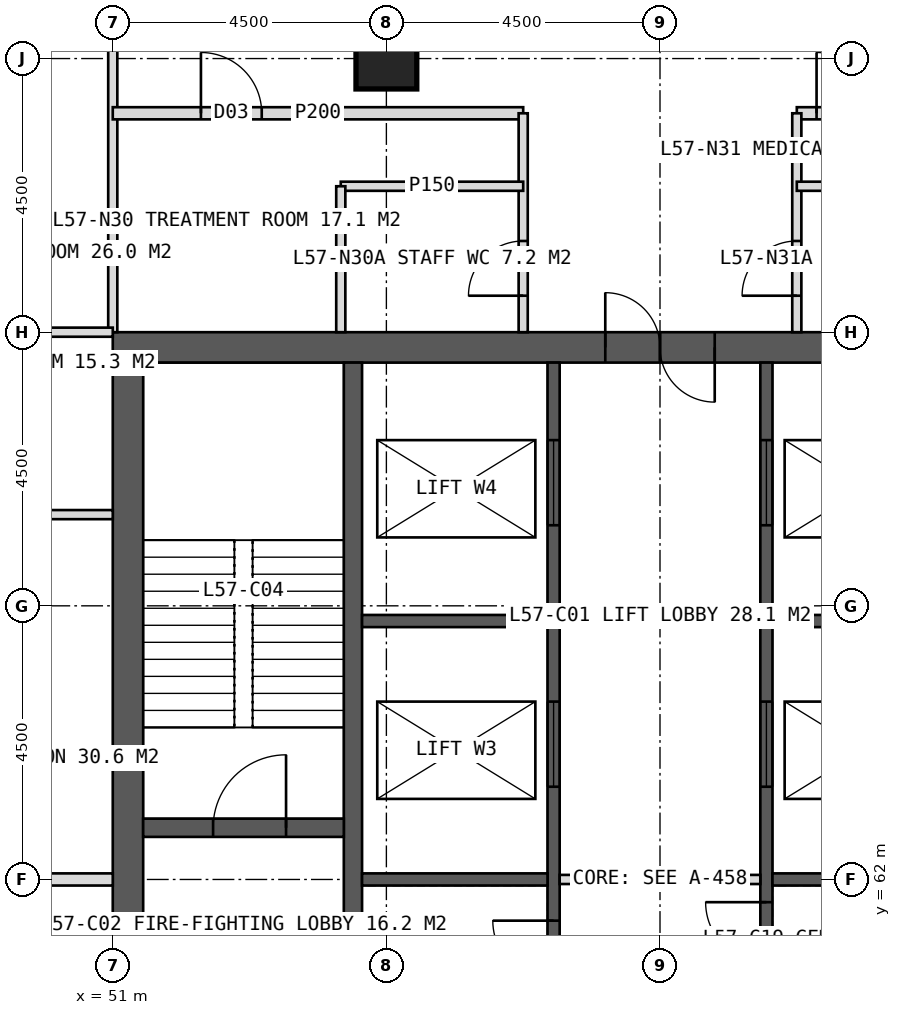
"""IFC4 building model, lengths in metres.
Left out: names, types, materials, properties, quantities, classifications, styles, units other than length and angle.
Written with IfcOpenShell. Run it as: python <this file> out.ifc"""

import sys

from ifc_helpers import new_model, si_unit, direction, frame, frame_2d, origin, origin_2d, place, context, subcontext, project, spatial, rectangle, hollow_rectangle, extrude, element, fill, save


model = new_model("IFC4")
c1 = context("Model", 3, precision=1e-05, world=origin(), true_north=direction((0.0, 1.0)))
c2 = subcontext(c1, "Body", "Model", "MODEL_VIEW")
j1 = project(units=[si_unit("LENGTHUNIT", "METRE"), si_unit("PLANEANGLEUNIT", "RADIAN")], contexts=[c1])
p1 = place(None, origin())
s1 = spatial("IfcSite", under=j1, at=p1, CompositionType="ELEMENT")
p2 = place(p1, origin())
s2 = spatial("IfcBuilding", under=s1, at=p2, CompositionType="ELEMENT")
p3 = place(p2, frame((0.0, 0.0, 237.0)))
s3 = spatial("IfcBuildingStorey", under=s2, at=p3, CompositionType="ELEMENT", Elevation=237.0)
p4 = place(p3, frame((51.0, 70.75, 0.0), z_axis=(0.0, 0.0, 1.0), x_axis=(1.0, 0.0, 0.0)))
e1 = element("IfcWall", 1, at=p4, inside=s3, PredefinedType="SHEAR", context=c2, shape_type="SweptSolid", body=[
    extrude(rectangle(XDim=18.0, YDim=0.5, at=frame_2d((9.0, 0.0))), origin(), (0.0, 0.0, 1.0), 4.0),
])
p5 = place(p4, frame((8.1, 0.0, 0.0)))
e2 = element("IfcOpeningElement", 2, at=p5, cuts=e1, PredefinedType="OPENING", context=c2, shape_type="SweptSolid", body=[
    extrude(rectangle(XDim=1.8, YDim=2.2, at=frame_2d((0.9, 1.1))), frame((0.0, 0.26, 0.0), z_axis=(0.0, -1.0, 0.0), x_axis=(1.0, 0.0, 0.0)), (0.0, 0.0, 1.0), 0.52),
])
p6 = place(p3, frame((51.25, 53.5, 0.0), z_axis=(0.0, 0.0, 1.0), x_axis=(0.0, 1.0, 0.0)))
e3 = element("IfcWall", 3, at=p6, inside=s3, PredefinedType="SHEAR", context=c2, shape_type="SweptSolid", body=[
    extrude(rectangle(XDim=17.0, YDim=0.5, at=frame_2d((8.5, 0.0))), origin(), (0.0, 0.0, 1.0), 4.0),
])
p7 = place(p6, frame((6.1, 0.0, 0.0)))
e4 = element("IfcOpeningElement", 4, at=p7, cuts=e3, PredefinedType="OPENING", context=c2, shape_type="SweptSolid", body=[
    extrude(rectangle(XDim=1.5, YDim=2.2, at=frame_2d((0.75, 1.1))), frame((0.0, 0.26, 0.0), z_axis=(0.0, -1.0, 0.0), x_axis=(1.0, 0.0, 0.0)), (0.0, 0.0, 1.0), 0.52),
])
p8 = place(p3, frame((54.95, 53.5, 0.0), z_axis=(0.0, 0.0, 1.0), x_axis=(0.0, 1.0, 0.0)))
e5 = element("IfcWall", 5, at=p8, inside=s3, PredefinedType="SHEAR", context=c2, shape_type="SweptSolid", body=[
    extrude(rectangle(XDim=17.0, YDim=0.3, at=frame_2d((8.5, 0.0))), origin(), (0.0, 0.0, 1.0), 4.0),
])
p9 = place(p3, frame((58.25, 53.5, 0.0), z_axis=(0.0, 0.0, 1.0), x_axis=(0.0, 1.0, 0.0)))
e6 = element("IfcWall", 6, at=p9, inside=s3, PredefinedType="SHEAR", context=c2, shape_type="SweptSolid", body=[
    extrude(rectangle(XDim=17.0, YDim=0.2, at=frame_2d((8.5, 0.0))), origin(), (0.0, 0.0, 1.0), 4.0),
])
p10 = place(p9, frame((0.808, 0.0, 0.0)))
e7 = element("IfcOpeningElement", 7, at=p10, cuts=e6, PredefinedType="OPENING", context=c2, shape_type="SweptSolid", body=[
    extrude(rectangle(XDim=1.0, YDim=2.1, at=frame_2d((0.5, 1.05))), frame((0.0, 0.11, 0.0), z_axis=(0.0, -1.0, 0.0), x_axis=(1.0, 0.0, 0.0)), (0.0, 0.0, 1.0), 0.22),
])
p11 = place(p9, frame((2.958, 0.0, 0.0)))
e8 = element("IfcOpeningElement", 8, at=p11, cuts=e6, PredefinedType="OPENING", context=c2, shape_type="SweptSolid", body=[
    extrude(rectangle(XDim=1.0, YDim=2.1, at=frame_2d((0.5, 1.05))), frame((0.0, 0.11, 0.0), z_axis=(0.0, -1.0, 0.0), x_axis=(1.0, 0.0, 0.0)), (0.0, 0.0, 1.0), 0.22),
])
p12 = place(p9, frame((4.722, 0.0, 0.0)))
e9 = element("IfcOpeningElement", 9, at=p12, cuts=e6, PredefinedType="OPENING", context=c2, shape_type="SweptSolid", body=[
    extrude(rectangle(XDim=1.0, YDim=2.1, at=frame_2d((0.5, 1.05))), frame((0.0, 0.11, 0.0), z_axis=(0.0, -1.0, 0.0), x_axis=(1.0, 0.0, 0.0)), (0.0, 0.0, 1.0), 0.22),
])
p13 = place(p9, frame((6.823, 0.0, 0.0)))
e10 = element("IfcOpeningElement", 10, at=p13, cuts=e6, PredefinedType="OPENING", context=c2, shape_type="SweptSolid", body=[
    extrude(rectangle(XDim=1.0, YDim=2.1, at=frame_2d((0.5, 1.05))), frame((0.0, 0.11, 0.0), z_axis=(0.0, -1.0, 0.0), x_axis=(1.0, 0.0, 0.0)), (0.0, 0.0, 1.0), 0.22),
])
p14 = place(p9, frame((10.025, 0.0, 0.0)))
e11 = element("IfcOpeningElement", 11, at=p14, cuts=e6, PredefinedType="OPENING", context=c2, shape_type="SweptSolid", body=[
    extrude(rectangle(XDim=1.4, YDim=2.2, at=frame_2d((0.7, 1.1))), frame((0.0, 0.11, 0.0), z_axis=(0.0, -1.0, 0.0), x_axis=(1.0, 0.0, 0.0)), (0.0, 0.0, 1.0), 0.22),
])
p15 = place(p9, frame((14.325, 0.0, 0.0)))
e12 = element("IfcOpeningElement", 12, at=p15, cuts=e6, PredefinedType="OPENING", context=c2, shape_type="SweptSolid", body=[
    extrude(rectangle(XDim=1.4, YDim=2.2, at=frame_2d((0.7, 1.1))), frame((0.0, 0.11, 0.0), z_axis=(0.0, -1.0, 0.0), x_axis=(1.0, 0.0, 0.0)), (0.0, 0.0, 1.0), 0.22),
])
p16 = place(p3, frame((61.75, 53.5, 0.0), z_axis=(0.0, 0.0, 1.0), x_axis=(0.0, 1.0, 0.0)))
e13 = element("IfcWall", 13, at=p16, inside=s3, PredefinedType="SHEAR", context=c2, shape_type="SweptSolid", body=[
    extrude(rectangle(XDim=17.0, YDim=0.2, at=frame_2d((8.5, 0.0))), origin(), (0.0, 0.0, 1.0), 4.0),
])
p17 = place(p16, frame((0.496, 0.0, 0.0)))
e14 = element("IfcOpeningElement", 14, at=p17, cuts=e13, PredefinedType="OPENING", context=c2, shape_type="SweptSolid", body=[
    extrude(rectangle(XDim=1.0, YDim=2.1, at=frame_2d((0.5, 1.05))), frame((0.0, 0.11, 0.0), z_axis=(0.0, -1.0, 0.0), x_axis=(1.0, 0.0, 0.0)), (0.0, 0.0, 1.0), 0.22),
])
p18 = place(p16, frame((2.646, 0.0, 0.0)))
e15 = element("IfcOpeningElement", 15, at=p18, cuts=e13, PredefinedType="OPENING", context=c2, shape_type="SweptSolid", body=[
    extrude(rectangle(XDim=1.0, YDim=2.1, at=frame_2d((0.5, 1.05))), frame((0.0, 0.11, 0.0), z_axis=(0.0, -1.0, 0.0), x_axis=(1.0, 0.0, 0.0)), (0.0, 0.0, 1.0), 0.22),
])
p19 = place(p16, frame((5.027, 0.0, 0.0)))
e16 = element("IfcOpeningElement", 16, at=p19, cuts=e13, PredefinedType="OPENING", context=c2, shape_type="SweptSolid", body=[
    extrude(rectangle(XDim=1.0, YDim=2.1, at=frame_2d((0.5, 1.05))), frame((0.0, 0.11, 0.0), z_axis=(0.0, -1.0, 0.0), x_axis=(1.0, 0.0, 0.0)), (0.0, 0.0, 1.0), 0.22),
])
p20 = place(p16, frame((7.126, 0.0, 0.0)))
e17 = element("IfcOpeningElement", 17, at=p20, cuts=e13, PredefinedType="OPENING", context=c2, shape_type="SweptSolid", body=[
    extrude(rectangle(XDim=1.0, YDim=2.1, at=frame_2d((0.5, 1.05))), frame((0.0, 0.11, 0.0), z_axis=(0.0, -1.0, 0.0), x_axis=(1.0, 0.0, 0.0)), (0.0, 0.0, 1.0), 0.22),
])
p21 = place(p16, frame((10.025, 0.0, 0.0)))
e18 = element("IfcOpeningElement", 18, at=p21, cuts=e13, PredefinedType="OPENING", context=c2, shape_type="SweptSolid", body=[
    extrude(rectangle(XDim=1.4, YDim=2.2, at=frame_2d((0.7, 1.1))), frame((0.0, 0.11, 0.0), z_axis=(0.0, -1.0, 0.0), x_axis=(1.0, 0.0, 0.0)), (0.0, 0.0, 1.0), 0.22),
])
p22 = place(p16, frame((14.325, 0.0, 0.0)))
e19 = element("IfcOpeningElement", 19, at=p22, cuts=e13, PredefinedType="OPENING", context=c2, shape_type="SweptSolid", body=[
    extrude(rectangle(XDim=1.4, YDim=2.2, at=frame_2d((0.7, 1.1))), frame((0.0, 0.11, 0.0), z_axis=(0.0, -1.0, 0.0), x_axis=(1.0, 0.0, 0.0)), (0.0, 0.0, 1.0), 0.22),
])
for number, where, z_axis, x_axis in (
    (20, (55.1, 62.0, 0.0), (0.0, 0.0, 1.0), (1.0, 0.0, 0.0)),
    (21, (61.85, 62.0, 0.0), (0.0, 0.0, 1.0), (1.0, 0.0, 0.0)),
    (22, (55.1, 66.25, 0.0), (0.0, 0.0, 1.0), (1.0, 0.0, 0.0)),
    (23, (61.85, 66.25, 0.0), (0.0, 0.0, 1.0), (1.0, 0.0, 0.0)),
):
    element("IfcWall", number, at=place(p3, frame(where, z_axis=z_axis, x_axis=x_axis)), inside=s3, PredefinedType="SHEAR", context=c2, shape_type="SweptSolid", body=[
        extrude(rectangle(XDim=3.05, YDim=0.2, at=frame_2d((1.525, 0.0))), origin(), (0.0, 0.0, 1.0), 4.0),
    ])
p23 = place(p3, frame((51.5, 62.85, 0.0), z_axis=(0.0, 0.0, 1.0), x_axis=(1.0, 0.0, 0.0)))
e24 = element("IfcWall", 24, at=p23, inside=s3, PredefinedType="SHEAR", context=c2, shape_type="SweptSolid", body=[
    extrude(rectangle(XDim=3.3, YDim=0.3, at=frame_2d((1.65, 0.0))), origin(), (0.0, 0.0, 1.0), 4.0),
])
p24 = place(p23, frame((1.15, 0.0, 0.0)))
e25 = element("IfcOpeningElement", 25, at=p24, cuts=e24, PredefinedType="OPENING", context=c2, shape_type="SweptSolid", body=[
    extrude(rectangle(XDim=1.2, YDim=2.1, at=frame_2d((0.6, 1.05))), frame((0.0, 0.16, 0.0), z_axis=(0.0, -1.0, 0.0), x_axis=(1.0, 0.0, 0.0)), (0.0, 0.0, 1.0), 0.32),
])
p25 = place(p3, frame((55.5, 75.5, 0.0), z_axis=(0.0, 0.0, 1.0), x_axis=(1.0, 0.0, 0.0)))
e26 = element("IfcColumn", 26, at=p25, inside=s3, PredefinedType="COLUMN", context=c2, shape_type="SweptSolid", body=[
    extrude(hollow_rectangle(XDim=1.0, YDim=1.0, WallThickness=0.1, at=origin_2d()), origin(), (0.0, 0.0, 1.0), 4.0),
])
p26 = place(p3, frame((51.0, 71.0, 0.0), z_axis=(0.0, 0.0, 1.0), x_axis=(0.0, 1.0, 0.0)))
e27 = element("IfcWall", 27, at=p26, inside=s3, PredefinedType="PARTITIONING", context=c2, shape_type="SweptSolid", body=[
    extrude(rectangle(XDim=5.1, YDim=0.15, at=frame_2d((2.55, 0.0))), origin(), (0.0, 0.0, 1.0), 3.75),
])
p27 = place(p3, frame((51.0, 74.6, 0.0), z_axis=(0.0, 0.0, 1.0), x_axis=(1.0, 0.0, 0.0)))
e28 = element("IfcWall", 28, at=p27, inside=s3, PredefinedType="PARTITIONING", context=c2, shape_type="SweptSolid", body=[
    extrude(rectangle(XDim=6.75, YDim=0.2, at=frame_2d((3.375, 0.0))), origin(), (0.0, 0.0, 1.0), 3.75),
])
p28 = place(p27, frame((1.45, 0.0, 0.0)))
e29 = element("IfcOpeningElement", 29, at=p28, cuts=e28, PredefinedType="OPENING", context=c2, shape_type="SweptSolid", body=[
    extrude(rectangle(XDim=1.0, YDim=2.1, at=frame_2d((0.5, 1.05))), frame((0.0, 0.11, 0.0), z_axis=(0.0, -1.0, 0.0), x_axis=(1.0, 0.0, 0.0)), (0.0, 0.0, 1.0), 0.22),
])
p29 = place(p3, frame((62.25, 74.6, 0.0), z_axis=(0.0, 0.0, 1.0), x_axis=(1.0, 0.0, 0.0)))
e30 = element("IfcWall", 30, at=p29, inside=s3, PredefinedType="PARTITIONING", context=c2, shape_type="SweptSolid", body=[
    extrude(rectangle(XDim=6.75, YDim=0.2, at=frame_2d((3.375, 0.0))), origin(), (0.0, 0.0, 1.0), 3.75),
])
p30 = place(p29, frame((0.325, 0.0, 0.0)))
e31 = element("IfcOpeningElement", 31, at=p30, cuts=e30, PredefinedType="OPENING", context=c2, shape_type="SweptSolid", body=[
    extrude(rectangle(XDim=1.0, YDim=2.1, at=frame_2d((0.5, 1.05))), frame((0.0, 0.11, 0.0), z_axis=(0.0, -1.0, 0.0), x_axis=(1.0, 0.0, 0.0)), (0.0, 0.0, 1.0), 0.22),
])
p31 = place(p29, frame((4.75, 0.0, 0.0)))
e32 = element("IfcOpeningElement", 32, at=p31, cuts=e30, PredefinedType="OPENING", context=c2, shape_type="SweptSolid", body=[
    extrude(rectangle(XDim=1.0, YDim=2.1, at=frame_2d((0.5, 1.05))), frame((0.0, 0.11, 0.0), z_axis=(0.0, -1.0, 0.0), x_axis=(1.0, 0.0, 0.0)), (0.0, 0.0, 1.0), 0.22),
])
p32 = place(p3, frame((57.75, 71.0, 0.0), z_axis=(0.0, 0.0, 1.0), x_axis=(0.0, 1.0, 0.0)))
e33 = element("IfcWall", 33, at=p32, inside=s3, PredefinedType="PARTITIONING", context=c2, shape_type="SweptSolid", body=[
    extrude(rectangle(XDim=3.6, YDim=0.15, at=frame_2d((1.8, 0.0))), origin(), (0.0, 0.0, 1.0), 3.75),
])
p33 = place(p32, frame((0.6, 0.0, 0.0)))
e34 = element("IfcOpeningElement", 34, at=p33, cuts=e33, PredefinedType="OPENING", context=c2, shape_type="SweptSolid", body=[
    extrude(rectangle(XDim=0.9, YDim=2.1, at=frame_2d((0.45, 1.05))), frame((0.0, 0.085, 0.0), z_axis=(0.0, -1.0, 0.0), x_axis=(1.0, 0.0, 0.0)), (0.0, 0.0, 1.0), 0.17),
])
p34 = place(p3, frame((62.25, 71.0, 0.0), z_axis=(0.0, 0.0, 1.0), x_axis=(0.0, 1.0, 0.0)))
e35 = element("IfcWall", 35, at=p34, inside=s3, PredefinedType="PARTITIONING", context=c2, shape_type="SweptSolid", body=[
    extrude(rectangle(XDim=3.6, YDim=0.15, at=frame_2d((1.8, 0.0))), origin(), (0.0, 0.0, 1.0), 3.75),
])
p35 = place(p34, frame((0.6, 0.0, 0.0)))
e36 = element("IfcOpeningElement", 36, at=p35, cuts=e35, PredefinedType="OPENING", context=c2, shape_type="SweptSolid", body=[
    extrude(rectangle(XDim=0.9, YDim=2.1, at=frame_2d((0.45, 1.05))), frame((0.0, 0.085, 0.0), z_axis=(0.0, -1.0, 0.0), x_axis=(1.0, 0.0, 0.0)), (0.0, 0.0, 1.0), 0.17),
])
p36 = place(p3, frame((54.75, 73.4, 0.0), z_axis=(0.0, 0.0, 1.0), x_axis=(1.0, 0.0, 0.0)))
e37 = element("IfcWall", 37, at=p36, inside=s3, PredefinedType="PARTITIONING", context=c2, shape_type="SweptSolid", body=[
    extrude(rectangle(XDim=3.0, YDim=0.15, at=frame_2d((1.5, 0.0))), origin(), (0.0, 0.0, 1.0), 3.75),
])
p37 = place(p3, frame((54.75, 71.0, 0.0), z_axis=(0.0, 0.0, 1.0), x_axis=(0.0, 1.0, 0.0)))
e38 = element("IfcWall", 38, at=p37, inside=s3, PredefinedType="PARTITIONING", context=c2, shape_type="SweptSolid", body=[
    extrude(rectangle(XDim=2.4, YDim=0.15, at=frame_2d((1.2, 0.0))), origin(), (0.0, 0.0, 1.0), 3.75),
])
p38 = place(p3, frame((62.25, 73.4, 0.0), z_axis=(0.0, 0.0, 1.0), x_axis=(1.0, 0.0, 0.0)))
e39 = element("IfcWall", 39, at=p38, inside=s3, PredefinedType="PARTITIONING", context=c2, shape_type="SweptSolid", body=[
    extrude(rectangle(XDim=3.0, YDim=0.15, at=frame_2d((1.5, 0.0))), origin(), (0.0, 0.0, 1.0), 3.75),
])
p39 = place(p3, frame((51.0, 62.0, 0.0), z_axis=(0.0, 0.0, 1.0), x_axis=(-1.0, 0.0, 0.0)))
e40 = element("IfcWall", 40, at=p39, inside=s3, PredefinedType="SOLIDWALL", context=c2, shape_type="SweptSolid", body=[
    extrude(rectangle(XDim=5.1, YDim=0.2, at=frame_2d((2.55, 0.0))), origin(), (0.0, 0.0, 1.0), 2.95),
])
for number, where, z_axis, x_axis in (
    (41, (51.0, 68.0, 0.0), (0.0, 0.0, 1.0), (-1.0, 0.0, 0.0)),
    (42, (51.0, 71.0, 0.0), (0.0, 0.0, 1.0), (-1.0, 0.0, 0.0)),
):
    element("IfcWall", number, at=place(p3, frame(where, z_axis=z_axis, x_axis=x_axis)), inside=s3, PredefinedType="PARTITIONING", context=c2, shape_type="SweptSolid", body=[
        extrude(rectangle(XDim=5.1, YDim=0.15, at=frame_2d((2.55, 0.0))), origin(), (0.0, 0.0, 1.0), 3.75),
    ])
p40 = place(p3, frame((58.35, 62.0, 0.0), z_axis=(0.0, 0.0, 1.0), x_axis=(1.0, 0.0, 0.0)))
e43 = element("IfcWall", 43, at=p40, inside=s3, PredefinedType="PARTITIONING", context=c2, shape_type="SweptSolid", body=[
    extrude(rectangle(XDim=3.3, YDim=0.15, at=frame_2d((1.65, 0.0))), origin(), (0.0, 0.0, 1.0), 3.75),
])
p41 = place(p33, origin())
e44 = element("IfcDoor", 44, at=p41, inside=s3, OperationType="SINGLE_SWING_LEFT", PredefinedType="DOOR", context=c2, shape_type="SweptSolid", body=[
    extrude(rectangle(XDim=0.9, YDim=2.1, at=frame_2d((0.45, 1.05))), frame((0.0, 0.025, 0.0), z_axis=(0.0, -1.0, 0.0), x_axis=(1.0, 0.0, 0.0)), (0.0, 0.0, 1.0), 0.05),
])
fill(e34, e44)
p42 = place(p28, origin())
e45 = element("IfcDoor", 45, at=p42, inside=s3, OperationType="SINGLE_SWING_LEFT", PredefinedType="DOOR", context=c2, shape_type="SweptSolid", body=[
    extrude(rectangle(XDim=1.0, YDim=2.1, at=frame_2d((0.5, 1.05))), frame((0.0, 0.025, 0.0), z_axis=(0.0, -1.0, 0.0), x_axis=(1.0, 0.0, 0.0)), (0.0, 0.0, 1.0), 0.05),
])
fill(e29, e45)
p43 = place(p35, origin())
e46 = element("IfcDoor", 46, at=p43, inside=s3, OperationType="SINGLE_SWING_LEFT", PredefinedType="DOOR", context=c2, shape_type="SweptSolid", body=[
    extrude(rectangle(XDim=0.9, YDim=2.1, at=frame_2d((0.45, 1.05))), frame((0.0, 0.025, 0.0), z_axis=(0.0, -1.0, 0.0), x_axis=(1.0, 0.0, 0.0)), (0.0, 0.0, 1.0), 0.05),
])
fill(e36, e46)
p44 = place(p30, origin())
e47 = element("IfcDoor", 47, at=p44, inside=s3, OperationType="SINGLE_SWING_LEFT", PredefinedType="DOOR", context=c2, shape_type="SweptSolid", body=[
    extrude(rectangle(XDim=1.0, YDim=2.1, at=frame_2d((0.5, 1.05))), frame((0.0, 0.025, 0.0), z_axis=(0.0, -1.0, 0.0), x_axis=(1.0, 0.0, 0.0)), (0.0, 0.0, 1.0), 0.05),
])
fill(e31, e47)
p45 = place(p5, origin())
e48 = element("IfcDoor", 48, at=p45, inside=s3, OperationType="DOUBLE_DOOR_SINGLE_SWING", PredefinedType="DOOR", context=c2, shape_type="SweptSolid", body=[
    extrude(rectangle(XDim=1.8, YDim=2.2, at=frame_2d((0.9, 1.1))), frame((0.0, 0.025, 0.0), z_axis=(0.0, -1.0, 0.0), x_axis=(1.0, 0.0, 0.0)), (0.0, 0.0, 1.0), 0.05),
])
fill(e2, e48)
p46 = place(p7, origin())
e49 = element("IfcDoor", 49, at=p46, inside=s3, OperationType="DOUBLE_DOOR_SINGLE_SWING", PredefinedType="DOOR", context=c2, shape_type="SweptSolid", body=[
    extrude(rectangle(XDim=1.5, YDim=2.2, at=frame_2d((0.75, 1.1))), frame((0.0, 0.025, 0.0), z_axis=(0.0, -1.0, 0.0), x_axis=(1.0, 0.0, 0.0)), (0.0, 0.0, 1.0), 0.05),
])
fill(e4, e49)
p47 = place(p24, origin())
e50 = element("IfcDoor", 50, at=p47, inside=s3, OperationType="SINGLE_SWING_RIGHT", PredefinedType="DOOR", context=c2, shape_type="SweptSolid", body=[
    extrude(rectangle(XDim=1.2, YDim=2.1, at=frame_2d((0.6, 1.05))), frame((0.0, 0.025, 0.0), z_axis=(0.0, -1.0, 0.0), x_axis=(1.0, 0.0, 0.0)), (0.0, 0.0, 1.0), 0.05),
])
fill(e25, e50)
p48 = place(p13, origin())
e51 = element("IfcDoor", 51, at=p48, inside=s3, OperationType="SINGLE_SWING_RIGHT", PredefinedType="DOOR", context=c2, shape_type="SweptSolid", body=[
    extrude(rectangle(XDim=1.0, YDim=2.1, at=frame_2d((0.5, 1.05))), frame((0.0, 0.025, 0.0), z_axis=(0.0, -1.0, 0.0), x_axis=(1.0, 0.0, 0.0)), (0.0, 0.0, 1.0), 0.05),
])
fill(e10, e51)
p49 = place(p20, origin())
e52 = element("IfcDoor", 52, at=p49, inside=s3, OperationType="SINGLE_SWING_RIGHT", PredefinedType="DOOR", context=c2, shape_type="SweptSolid", body=[
    extrude(rectangle(XDim=1.0, YDim=2.1, at=frame_2d((0.5, 1.05))), frame((0.0, 0.025, 0.0), z_axis=(0.0, -1.0, 0.0), x_axis=(1.0, 0.0, 0.0)), (0.0, 0.0, 1.0), 0.05),
])
fill(e17, e52)
p50 = place(p14, origin())
e53 = element("IfcDoor", 53, at=p50, inside=s3, OperationType="SLIDING_TO_LEFT", PredefinedType="DOOR", context=c2, shape_type="SweptSolid", body=[
    extrude(rectangle(XDim=1.4, YDim=2.2, at=frame_2d((0.7, 1.1))), frame((0.0, 0.025, 0.0), z_axis=(0.0, -1.0, 0.0), x_axis=(1.0, 0.0, 0.0)), (0.0, 0.0, 1.0), 0.05),
])
fill(e11, e53)
p51 = place(p21, origin())
e54 = element("IfcDoor", 54, at=p51, inside=s3, OperationType="SLIDING_TO_LEFT", PredefinedType="DOOR", context=c2, shape_type="SweptSolid", body=[
    extrude(rectangle(XDim=1.4, YDim=2.2, at=frame_2d((0.7, 1.1))), frame((0.0, 0.025, 0.0), z_axis=(0.0, -1.0, 0.0), x_axis=(1.0, 0.0, 0.0)), (0.0, 0.0, 1.0), 0.05),
])
fill(e18, e54)
p52 = place(p15, origin())
e55 = element("IfcDoor", 55, at=p52, inside=s3, OperationType="SLIDING_TO_LEFT", PredefinedType="DOOR", context=c2, shape_type="SweptSolid", body=[
    extrude(rectangle(XDim=1.4, YDim=2.2, at=frame_2d((0.7, 1.1))), frame((0.0, 0.025, 0.0), z_axis=(0.0, -1.0, 0.0), x_axis=(1.0, 0.0, 0.0)), (0.0, 0.0, 1.0), 0.05),
])
fill(e12, e55)
p53 = place(p22, origin())
e56 = element("IfcDoor", 56, at=p53, inside=s3, OperationType="SLIDING_TO_LEFT", PredefinedType="DOOR", context=c2, shape_type="SweptSolid", body=[
    extrude(rectangle(XDim=1.4, YDim=2.2, at=frame_2d((0.7, 1.1))), frame((0.0, 0.025, 0.0), z_axis=(0.0, -1.0, 0.0), x_axis=(1.0, 0.0, 0.0)), (0.0, 0.0, 1.0), 0.05),
])
fill(e19, e56)
save(model, sys.argv[1])
